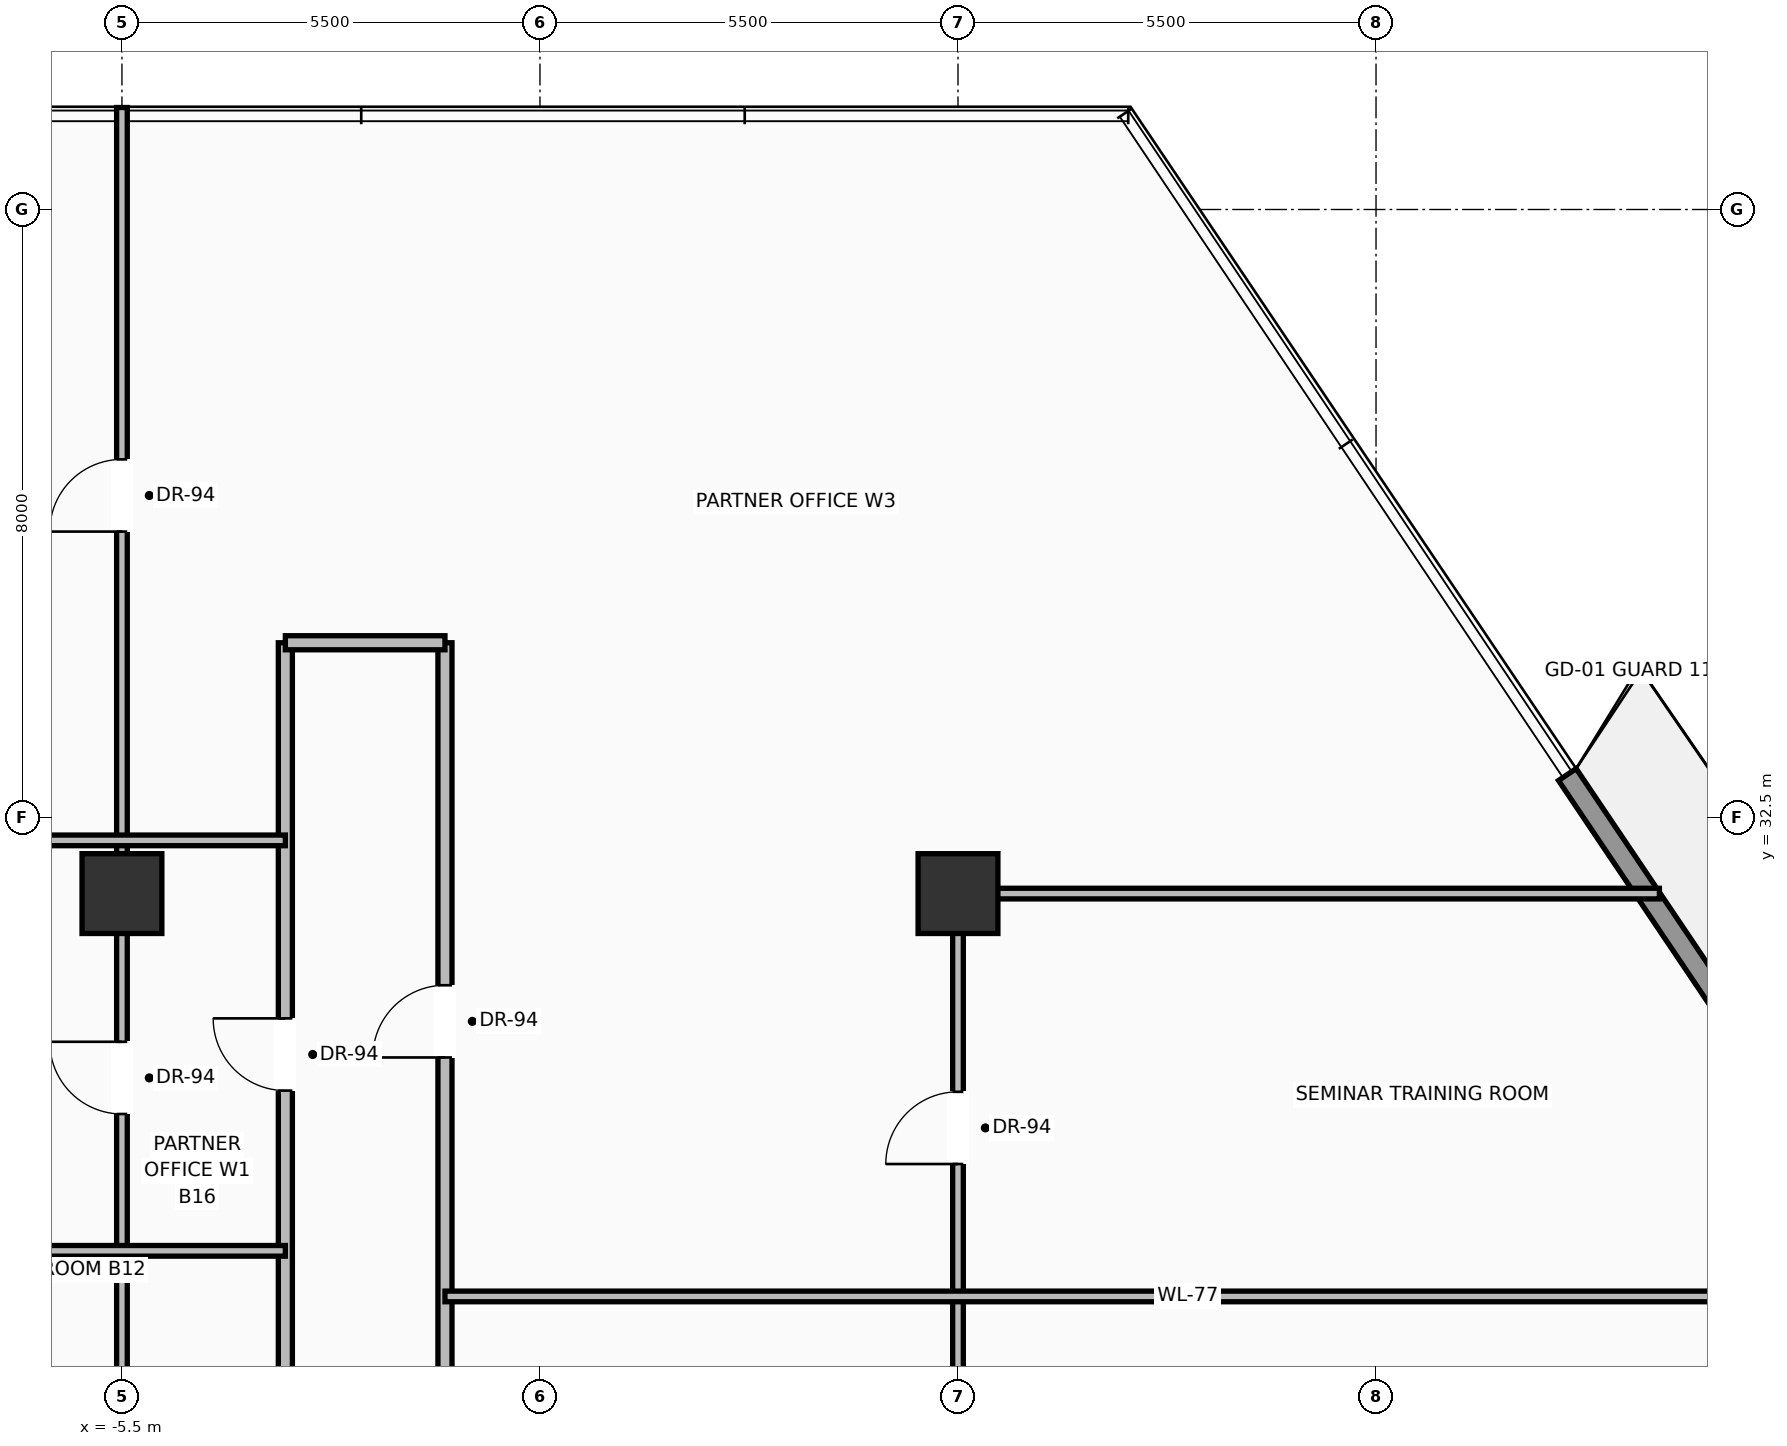
"""IFC4 building model, lengths in metres.
Left out: names, types, materials, properties, quantities, classifications, styles, units other than length and angle.
Written with IfcOpenShell. Run it as: python <this file> out.ifc"""

import sys

from ifc_helpers import new_model, si_unit, direction, frame, frame_2d, origin, origin_2d, place, context, subcontext, project, spatial, rectangle, extrude, source, transform, mapped, element, fill, save


model = new_model("IFC4")
c1 = context("Model", 3, precision=1e-05, world=origin(), true_north=direction((0.0, 1.0)))
c2 = subcontext(c1, "Body", "Model", "MODEL_VIEW")
j1 = project(units=[si_unit("LENGTHUNIT", "METRE"), si_unit("PLANEANGLEUNIT", "RADIAN")], contexts=[c1])
p1 = place(None, origin())
s1 = spatial("IfcSite", under=j1, at=p1, CompositionType="ELEMENT")
p2 = place(p1, origin())
s2 = spatial("IfcBuilding", under=s1, at=p2, CompositionType="ELEMENT")
p3 = place(p2, frame((0.0, 0.0, 42.3)))
s3 = spatial("IfcBuildingStorey", under=s2, at=p3, CompositionType="ELEMENT", Elevation=42.3)
m1 = source(origin(), c2, "Body", "SweptSolid", [
    extrude(rectangle(XDim=1.05, YDim=1.05, at=origin_2d()), origin(), (0.0, 0.0, 1.0), 3.7),
])
for number, where, z_axis, x_axis in (
    (1, (-5.5, 31.5, 0.0), (0.0, 0.0, 1.0), (1.0, 0.0, 0.0)),
    (2, (5.5, 31.5, 0.0), (0.0, 0.0, 1.0), (1.0, 0.0, 0.0)),
):
    element("IfcColumn", number, at=place(p3, frame(where, z_axis=z_axis, x_axis=x_axis)), inside=s3, PredefinedType="COLUMN", context=c2, shape_type="MappedRepresentation", body=[
        mapped(m1, transform((0.0, 0.0, 0.0), scale=1.0)),
    ])
p4 = place(p3, frame((13.517, 33.066, 0.0), z_axis=(0.0, 0.0, 1.0), x_axis=(0.558563601605, -0.829461694692, 0.0)))
e3 = element("IfcWall", 3, at=p4, inside=s3, PredefinedType="SOLIDWALL", context=c2, shape_type="SweptSolid", body=[
    extrude(rectangle(XDim=16.497, YDim=0.28, at=frame_2d((8.249, 0.0))), origin(), (0.0, 0.0, 1.0), 3.03),
])
p5 = place(p4, frame((3.959, 0.0, 0.0)))
e4 = element("IfcOpeningElement", 4, at=p5, cuts=e3, PredefinedType="OPENING", context=c2, shape_type="SweptSolid", body=[
    extrude(rectangle(XDim=1.6, YDim=2.35, at=frame_2d((0.8, 1.175))), frame((0.0, 0.15, 0.0), z_axis=(0.0, -1.0, 0.0), x_axis=(1.0, 0.0, 0.0)), (0.0, 0.0, 1.0), 0.3),
])
p6 = place(p4, frame((11.218, 0.0, 0.9)))
e5 = element("IfcOpeningElement", 5, at=p6, cuts=e3, PredefinedType="OPENING", context=c2, shape_type="SweptSolid", body=[
    extrude(rectangle(XDim=1.55, YDim=1.85, at=frame_2d((0.775, 0.925))), frame((0.0, 0.15, 0.0), z_axis=(0.0, -1.0, 0.0), x_axis=(1.0, 0.0, 0.0)), (0.0, 0.0, 1.0), 0.3),
])
p7 = place(p3, frame((-3.35, 18.65, 0.0), z_axis=(0.0, 0.0, 1.0), x_axis=(0.0, 1.0, 0.0)))
e6 = element("IfcWall", 6, at=p7, inside=s3, PredefinedType="PARTITIONING", context=c2, shape_type="SweptSolid", body=[
    extrude(rectangle(XDim=16.15, YDim=0.185, at=frame_2d((8.075, 0.0))), origin(), (0.0, 0.0, 1.0), 2.747),
])
p8 = place(p7, frame((4.506, 0.0, 0.0)))
e7 = element("IfcOpeningElement", 7, at=p8, cuts=e6, PredefinedType="OPENING", context=c2, shape_type="SweptSolid", body=[
    extrude(rectangle(XDim=0.95, YDim=2.2, at=frame_2d((0.475, 1.1))), frame((0.0, 0.103, 0.0), z_axis=(0.0, -1.0, 0.0), x_axis=(1.0, 0.0, 0.0)), (0.0, 0.0, 1.0), 0.205),
])
p9 = place(p7, frame((10.258, 0.0, 0.0)))
e8 = element("IfcOpeningElement", 8, at=p9, cuts=e6, PredefinedType="OPENING", context=c2, shape_type="SweptSolid", body=[
    extrude(rectangle(XDim=0.95, YDim=2.2, at=frame_2d((0.475, 1.1))), frame((0.0, 0.103, 0.0), z_axis=(0.0, -1.0, 0.0), x_axis=(1.0, 0.0, 0.0)), (0.0, 0.0, 1.0), 0.205),
])
p10 = place(p3, frame((-1.25, 18.65, 0.0), z_axis=(0.0, 0.0, 1.0), x_axis=(0.0, 1.0, 0.0)))
e9 = element("IfcWall", 9, at=p10, inside=s3, PredefinedType="PARTITIONING", context=c2, shape_type="SweptSolid", body=[
    extrude(rectangle(XDim=16.15, YDim=0.185, at=frame_2d((8.075, 0.0))), origin(), (0.0, 0.0, 1.0), 2.747),
])
p11 = place(p10, frame((10.694, 0.0, 0.0)))
e10 = element("IfcOpeningElement", 10, at=p11, cuts=e9, PredefinedType="OPENING", context=c2, shape_type="SweptSolid", body=[
    extrude(rectangle(XDim=0.95, YDim=2.2, at=frame_2d((0.475, 1.1))), frame((0.0, 0.103, 0.0), z_axis=(0.0, -1.0, 0.0), x_axis=(1.0, 0.0, 0.0)), (0.0, 0.0, 1.0), 0.205),
])
p12 = place(p3, frame((-3.35, 34.8, 0.0), z_axis=(0.0, 0.0, 1.0), x_axis=(1.0, 0.0, 0.0)))
e11 = element("IfcWall", 11, at=p12, inside=s3, PredefinedType="PARTITIONING", context=c2, shape_type="SweptSolid", body=[
    extrude(rectangle(XDim=2.1, YDim=0.185, at=frame_2d((1.05, 0.0))), origin(), (0.0, 0.0, 1.0), 2.979),
])
p13 = place(p3, frame((-5.5, 24.5, 0.0), z_axis=(0.0, 0.0, 1.0), x_axis=(0.0, 1.0, 0.0)))
e12 = element("IfcWall", 12, at=p13, inside=s3, PredefinedType="PARTITIONING", context=c2, shape_type="SweptSolid", body=[
    extrude(rectangle(XDim=17.342, YDim=0.14, at=frame_2d((8.671, 0.0))), origin(), (0.0, 0.0, 1.0), 2.747),
])
p14 = place(p13, frame((11.762, 0.0, 0.0)))
e13 = element("IfcOpeningElement", 13, at=p14, cuts=e12, PredefinedType="OPENING", context=c2, shape_type="SweptSolid", body=[
    extrude(rectangle(XDim=0.95, YDim=2.2, at=frame_2d((0.475, 1.1))), frame((0.0, 0.08, 0.0), z_axis=(0.0, -1.0, 0.0), x_axis=(1.0, 0.0, 0.0)), (0.0, 0.0, 1.0), 0.16),
])
p15 = place(p13, frame((4.1, 0.0, 0.0)))
e14 = element("IfcOpeningElement", 14, at=p15, cuts=e12, PredefinedType="OPENING", context=c2, shape_type="SweptSolid", body=[
    extrude(rectangle(XDim=0.95, YDim=2.2, at=frame_2d((0.475, 1.1))), frame((0.0, 0.08, 0.0), z_axis=(0.0, -1.0, 0.0), x_axis=(1.0, 0.0, 0.0)), (0.0, 0.0, 1.0), 0.16),
])
p16 = place(p3, frame((5.5, 18.3, 0.0), z_axis=(0.0, 0.0, 1.0), x_axis=(0.0, 1.0, 0.0)))
e15 = element("IfcWall", 15, at=p16, inside=s3, PredefinedType="PARTITIONING", context=c2, shape_type="SweptSolid", body=[
    extrude(rectangle(XDim=13.2, YDim=0.14, at=frame_2d((6.6, 0.0))), origin(), (0.0, 0.0, 1.0), 2.747),
])
p17 = place(p16, frame((9.642, 0.0, 0.0)))
e16 = element("IfcOpeningElement", 16, at=p17, cuts=e15, PredefinedType="OPENING", context=c2, shape_type="SweptSolid", body=[
    extrude(rectangle(XDim=0.95, YDim=2.2, at=frame_2d((0.475, 1.1))), frame((0.0, 0.08, 0.0), z_axis=(0.0, -1.0, 0.0), x_axis=(1.0, 0.0, 0.0)), (0.0, 0.0, 1.0), 0.16),
])
p18 = place(p3, frame((5.5, 31.5, 0.0), z_axis=(0.0, 0.0, 1.0), x_axis=(1.0, 0.0, 0.0)))
e17 = element("IfcWall", 17, at=p18, inside=s3, PredefinedType="PARTITIONING", context=c2, shape_type="SweptSolid", body=[
    extrude(rectangle(XDim=9.229, YDim=0.14, at=frame_2d((4.614, 0.0))), origin(), (0.0, 0.0, 1.0), 2.747),
])
p19 = place(p3, frame((-17.674, 26.8, 0.0), z_axis=(0.0, 0.0, 1.0), x_axis=(1.0, 0.0, 0.0)))
e18 = element("IfcWall", 18, at=p19, inside=s3, PredefinedType="PARTITIONING", context=c2, shape_type="SweptSolid", body=[
    extrude(rectangle(XDim=14.324, YDim=0.14, at=frame_2d((7.162, 0.0))), origin(), (0.0, 0.0, 1.0), 2.747),
])
p20 = place(p19, frame((2.944, 0.0, 0.0)))
e19 = element("IfcOpeningElement", 19, at=p20, cuts=e18, PredefinedType="OPENING", context=c2, shape_type="SweptSolid", body=[
    extrude(rectangle(XDim=0.95, YDim=2.2, at=frame_2d((0.475, 1.1))), frame((0.0, 0.08, 0.0), z_axis=(0.0, -1.0, 0.0), x_axis=(1.0, 0.0, 0.0)), (0.0, 0.0, 1.0), 0.16),
])
p21 = place(p3, frame((-13.994, 32.2, 0.0), z_axis=(0.0, 0.0, 1.0), x_axis=(1.0, 0.0, 0.0)))
e20 = element("IfcWall", 20, at=p21, inside=s3, PredefinedType="PARTITIONING", context=c2, shape_type="SweptSolid", body=[
    extrude(rectangle(XDim=10.644, YDim=0.14, at=frame_2d((5.322, 0.0))), origin(), (0.0, 0.0, 1.0), 2.747),
])
p22 = place(p3, frame((-1.25, 26.2, 0.0), z_axis=(0.0, 0.0, 1.0), x_axis=(1.0, 0.0, 0.0)))
e21 = element("IfcWall", 21, at=p22, inside=s3, PredefinedType="PARTITIONING", context=c2, shape_type="SweptSolid", body=[
    extrude(rectangle(XDim=19.548, YDim=0.14, at=frame_2d((9.774, 0.0))), origin(), (0.0, 0.0, 1.0), 2.747),
])
m2 = source(origin(), c2, "Body", "SweptSolid", [
    extrude(rectangle(XDim=0.95, YDim=2.2, at=frame_2d((0.475, 1.1))), frame((0.0, 0.025, 0.0), z_axis=(0.0, -1.0, 0.0), x_axis=(1.0, 0.0, 0.0)), (0.0, 0.0, 1.0), 0.05),
])
p23 = place(p11, origin())
e22 = element("IfcDoor", 22, at=p23, inside=s3, OperationType="SINGLE_SWING_LEFT", PredefinedType="DOOR", context=c2, shape_type="MappedRepresentation", body=[
    mapped(m2, transform((0.0, 0.0, 0.0), scale=1.0)),
])
fill(e10, e22)
p24 = place(p17, origin())
e23 = element("IfcDoor", 23, at=p24, inside=s3, OperationType="SINGLE_SWING_LEFT", PredefinedType="DOOR", context=c2, shape_type="MappedRepresentation", body=[
    mapped(m2, transform((0.0, 0.0, 0.0), scale=1.0)),
])
fill(e16, e23)
p25 = place(p9, origin())
e24 = element("IfcDoor", 24, at=p25, inside=s3, OperationType="SINGLE_SWING_RIGHT", PredefinedType="DOOR", context=c2, shape_type="MappedRepresentation", body=[
    mapped(m2, transform((0.0, 0.0, 0.0), scale=1.0)),
])
fill(e8, e24)
p26 = place(p14, origin())
e25 = element("IfcDoor", 25, at=p26, inside=s3, OperationType="SINGLE_SWING_LEFT", PredefinedType="DOOR", context=c2, shape_type="MappedRepresentation", body=[
    mapped(m2, transform((0.0, 0.0, 0.0), scale=1.0)),
])
fill(e13, e25)
p27 = place(p15, origin())
e26 = element("IfcDoor", 26, at=p27, inside=s3, OperationType="SINGLE_SWING_RIGHT", PredefinedType="DOOR", context=c2, shape_type="MappedRepresentation", body=[
    mapped(m2, transform((0.0, 0.0, 0.0), scale=1.0)),
])
fill(e14, e26)
save(model, sys.argv[1])
